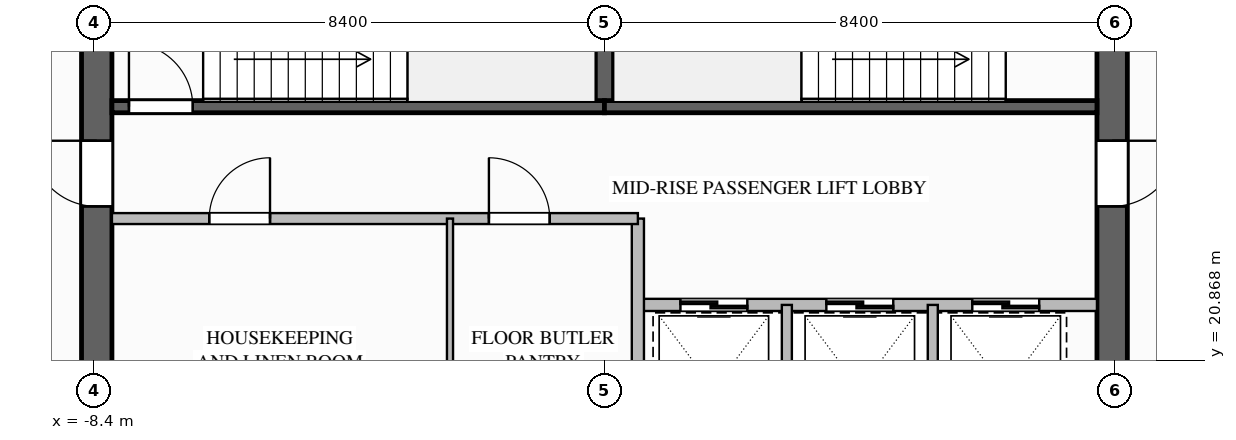
"""IFC4 building model, lengths in metres.
Left out: names, types, materials, properties, quantities, classifications, styles, units other than length and angle.
Written with IfcOpenShell. Run it as: python <this file> out.ifc"""

import sys

from ifc_helpers import new_model, si_unit, direction, frame, frame_2d, origin, place, context, subcontext, project, spatial, rectangle, extrude, element, fill, save


model = new_model("IFC4")
c1 = context("Model", 3, precision=1e-05, world=origin(), true_north=direction((0.0, 1.0)))
c2 = subcontext(c1, "Body", "Model", "MODEL_VIEW")
j1 = project(units=[si_unit("LENGTHUNIT", "METRE"), si_unit("PLANEANGLEUNIT", "RADIAN")], contexts=[c1])
p1 = place(None, origin())
s1 = spatial("IfcSite", under=j1, at=p1, CompositionType="ELEMENT")
p2 = place(p1, origin())
s2 = spatial("IfcBuilding", under=s1, at=p2, CompositionType="ELEMENT")
p3 = place(p2, frame((0.0, 0.0, 145.8)))
s3 = spatial("IfcBuildingStorey", under=s2, at=p3, CompositionType="ELEMENT", Elevation=145.8)
p4 = place(p3, frame((8.35, 35.1, 0.0), z_axis=(0.0, 0.0, 1.0), x_axis=(0.0, -1.0, 0.0)))
e1 = element("IfcWall", 1, at=p4, inside=s3, PredefinedType="SHEAR", context=c2, shape_type="SweptSolid", body=[
    extrude(rectangle(XDim=16.2, YDim=0.5, at=frame_2d((8.1, 0.0))), origin(), (0.0, 0.0, 1.0), 4.6),
])
p5 = place(p4, frame((3.08, 0.0, 0.0)))
e2 = element("IfcOpeningElement", 2, at=p5, cuts=e1, PredefinedType="OPENING", context=c2, shape_type="SweptSolid", body=[
    extrude(rectangle(XDim=1.12, YDim=2.1, at=frame_2d((0.56, 1.05))), frame((0.0, 0.26, 0.0), z_axis=(0.0, -1.0, 0.0), x_axis=(1.0, 0.0, 0.0)), (0.0, 0.0, 1.0), 0.52),
])
p6 = place(p4, frame((10.62, 0.0, 0.0)))
e3 = element("IfcOpeningElement", 3, at=p6, cuts=e1, PredefinedType="OPENING", context=c2, shape_type="SweptSolid", body=[
    extrude(rectangle(XDim=1.08, YDim=2.04, at=frame_2d((0.54, 1.02))), frame((0.0, 0.26, 0.0), z_axis=(0.0, -1.0, 0.0), x_axis=(1.0, 0.0, 0.0)), (0.0, 0.0, 1.0), 0.52),
])
p7 = place(p3, frame((-8.35, 18.9, 0.0), z_axis=(0.0, 0.0, 1.0), x_axis=(0.0, 1.0, 0.0)))
e4 = element("IfcWall", 4, at=p7, inside=s3, PredefinedType="SHEAR", context=c2, shape_type="SweptSolid", body=[
    extrude(rectangle(XDim=16.2, YDim=0.5, at=frame_2d((8.1, 0.0))), origin(), (0.0, 0.0, 1.0), 4.6),
])
p8 = place(p7, frame((12.02, 0.0, 0.0)))
e5 = element("IfcOpeningElement", 5, at=p8, cuts=e4, PredefinedType="OPENING", context=c2, shape_type="SweptSolid", body=[
    extrude(rectangle(XDim=1.08, YDim=2.04, at=frame_2d((0.54, 1.02))), frame((0.0, 0.26, 0.0), z_axis=(0.0, -1.0, 0.0), x_axis=(1.0, 0.0, 0.0)), (0.0, 0.0, 1.0), 0.52),
])
p9 = place(p7, frame((4.5, 0.0, 0.0)))
e6 = element("IfcOpeningElement", 6, at=p9, cuts=e4, PredefinedType="OPENING", context=c2, shape_type="SweptSolid", body=[
    extrude(rectangle(XDim=1.08, YDim=2.04, at=frame_2d((0.54, 1.02))), frame((0.0, 0.26, 0.0), z_axis=(0.0, -1.0, 0.0), x_axis=(1.0, 0.0, 0.0)), (0.0, 0.0, 1.0), 0.52),
])
p10 = place(p3, frame((0.0, 25.04, 0.0), z_axis=(0.0, 0.0, 1.0), x_axis=(0.0, 1.0, 0.0)))
e7 = element("IfcWall", 7, at=p10, inside=s3, PredefinedType="SOLIDWALL", context=c2, shape_type="SweptSolid", body=[
    extrude(rectangle(XDim=3.12, YDim=0.3, at=frame_2d((1.56, 0.0))), origin(), (0.0, 0.0, 1.0), 4.34),
])
p11 = place(p3, frame((-8.1, 25.04, 0.0), z_axis=(0.0, 0.0, 1.0), x_axis=(1.0, 0.0, 0.0)))
e8 = element("IfcWall", 8, at=p11, inside=s3, PredefinedType="SOLIDWALL", context=c2, shape_type="SweptSolid", body=[
    extrude(rectangle(XDim=8.1, YDim=0.2, at=frame_2d((4.05, 0.0))), origin(), (0.0, 0.0, 1.0), 4.34),
])
p12 = place(p11, frame((0.28, 0.0, 0.0)))
e9 = element("IfcOpeningElement", 9, at=p12, cuts=e8, PredefinedType="OPENING", context=c2, shape_type="SweptSolid", body=[
    extrude(rectangle(XDim=1.05, YDim=2.1, at=frame_2d((0.525, 1.05))), frame((0.0, 0.11, 0.0), z_axis=(0.0, -1.0, 0.0), x_axis=(1.0, 0.0, 0.0)), (0.0, 0.0, 1.0), 0.22),
])
p13 = place(p3, frame((0.0, 25.04, 0.0), z_axis=(0.0, 0.0, 1.0), x_axis=(1.0, 0.0, 0.0)))
e10 = element("IfcWall", 10, at=p13, inside=s3, PredefinedType="SOLIDWALL", context=c2, shape_type="SweptSolid", body=[
    extrude(rectangle(XDim=8.1, YDim=0.2, at=frame_2d((4.05, 0.0))), origin(), (0.0, 0.0, 1.0), 4.34),
])
p14 = place(p3, frame((8.1, 21.78, 0.0), z_axis=(0.0, 0.0, 1.0), x_axis=(-1.0, 0.0, 0.0)))
e11 = element("IfcWall", 11, at=p14, inside=s3, PredefinedType="SOLIDWALL", context=c2, shape_type="SweptSolid", body=[
    extrude(rectangle(XDim=7.55, YDim=0.2, at=frame_2d((3.775, 0.0))), origin(), (0.0, 0.0, 1.0), 4.34),
])
p15 = place(p14, frame((5.75, 0.0, 0.0)))
e12 = element("IfcOpeningElement", 12, at=p15, cuts=e11, PredefinedType="OPENING", context=c2, shape_type="SweptSolid", body=[
    extrude(rectangle(XDim=1.1, YDim=2.2, at=frame_2d((0.55, 1.1))), frame((0.0, 0.11, 0.0), z_axis=(0.0, -1.0, 0.0), x_axis=(1.0, 0.0, 0.0)), (0.0, 0.0, 1.0), 0.22),
])
p16 = place(p14, frame((3.35, 0.0, 0.0)))
e13 = element("IfcOpeningElement", 13, at=p16, cuts=e11, PredefinedType="OPENING", context=c2, shape_type="SweptSolid", body=[
    extrude(rectangle(XDim=1.1, YDim=2.2, at=frame_2d((0.55, 1.1))), frame((0.0, 0.11, 0.0), z_axis=(0.0, -1.0, 0.0), x_axis=(1.0, 0.0, 0.0)), (0.0, 0.0, 1.0), 0.22),
])
p17 = place(p14, frame((0.95, 0.0, 0.0)))
e14 = element("IfcOpeningElement", 14, at=p17, cuts=e11, PredefinedType="OPENING", context=c2, shape_type="SweptSolid", body=[
    extrude(rectangle(XDim=1.1, YDim=2.2, at=frame_2d((0.55, 1.1))), frame((0.0, 0.11, 0.0), z_axis=(0.0, -1.0, 0.0), x_axis=(1.0, 0.0, 0.0)), (0.0, 0.0, 1.0), 0.22),
])
p18 = place(p3, frame((0.55, 18.9, 0.0), z_axis=(0.0, 0.0, 1.0), x_axis=(0.0, 1.0, 0.0)))
e15 = element("IfcWall", 15, at=p18, inside=s3, PredefinedType="SOLIDWALL", context=c2, shape_type="SweptSolid", body=[
    extrude(rectangle(XDim=4.3, YDim=0.2, at=frame_2d((2.15, 0.0))), origin(), (0.0, 0.0, 1.0), 4.34),
])
for number, where, z_axis, x_axis in (
    (16, (3.0, 18.9, 0.0), (0.0, 0.0, 1.0), (0.0, 1.0, 0.0)),
    (17, (5.4, 18.9, 0.0), (0.0, 0.0, 1.0), (0.0, 1.0, 0.0)),
):
    element("IfcWall", number, at=place(p3, frame(where, z_axis=z_axis, x_axis=x_axis)), inside=s3, PredefinedType="PARTITIONING", context=c2, shape_type="SweptSolid", body=[
        extrude(rectangle(XDim=2.88, YDim=0.165, at=frame_2d((1.44, 0.0))), origin(), (0.0, 0.0, 1.0), 4.34),
    ])
p19 = place(p3, frame((-8.1, 23.2, 0.0), z_axis=(0.0, 0.0, 1.0), x_axis=(1.0, 0.0, 0.0)))
e18 = element("IfcWall", 18, at=p19, inside=s3, PredefinedType="SOLIDWALL", context=c2, shape_type="SweptSolid", body=[
    extrude(rectangle(XDim=8.65, YDim=0.18, at=frame_2d((4.325, 0.0))), origin(), (0.0, 0.0, 1.0), 4.34),
])
p20 = place(p19, frame((1.6, 0.0, 0.0)))
e19 = element("IfcOpeningElement", 19, at=p20, cuts=e18, PredefinedType="OPENING", context=c2, shape_type="SweptSolid", body=[
    extrude(rectangle(XDim=1.0, YDim=2.1, at=frame_2d((0.5, 1.05))), frame((0.0, 0.1, 0.0), z_axis=(0.0, -1.0, 0.0), x_axis=(1.0, 0.0, 0.0)), (0.0, 0.0, 1.0), 0.2),
])
p21 = place(p19, frame((6.2, 0.0, 0.0)))
e20 = element("IfcOpeningElement", 20, at=p21, cuts=e18, PredefinedType="OPENING", context=c2, shape_type="SweptSolid", body=[
    extrude(rectangle(XDim=1.0, YDim=2.1, at=frame_2d((0.5, 1.05))), frame((0.0, 0.1, 0.0), z_axis=(0.0, -1.0, 0.0), x_axis=(1.0, 0.0, 0.0)), (0.0, 0.0, 1.0), 0.2),
])
p22 = place(p3, frame((-2.54, 18.9, 0.0), z_axis=(0.0, 0.0, 1.0), x_axis=(0.0, 1.0, 0.0)))
e21 = element("IfcWall", 21, at=p22, inside=s3, PredefinedType="PARTITIONING", context=c2, shape_type="SweptSolid", body=[
    extrude(rectangle(XDim=4.3, YDim=0.1, at=frame_2d((2.15, 0.0))), origin(), (0.0, 0.0, 1.0), 4.34),
])
p23 = place(p12, origin())
e22 = element("IfcDoor", 22, at=p23, inside=s3, OperationType="SINGLE_SWING_LEFT", PredefinedType="DOOR", context=c2, shape_type="SweptSolid", body=[
    extrude(rectangle(XDim=1.05, YDim=2.1, at=frame_2d((0.525, 1.05))), frame((0.0, 0.025, 0.0), z_axis=(0.0, -1.0, 0.0), x_axis=(1.0, 0.0, 0.0)), (0.0, 0.0, 1.0), 0.05),
])
fill(e9, e22)
p24 = place(p15, origin())
e23 = element("IfcDoor", 23, at=p24, inside=s3, OperationType="SLIDING_TO_LEFT", PredefinedType="DOOR", context=c2, shape_type="SweptSolid", body=[
    extrude(rectangle(XDim=1.1, YDim=2.2, at=frame_2d((0.55, 1.1))), frame((0.0, 0.025, 0.0), z_axis=(0.0, -1.0, 0.0), x_axis=(1.0, 0.0, 0.0)), (0.0, 0.0, 1.0), 0.05),
])
fill(e12, e23)
p25 = place(p16, origin())
e24 = element("IfcDoor", 24, at=p25, inside=s3, OperationType="SLIDING_TO_LEFT", PredefinedType="DOOR", context=c2, shape_type="SweptSolid", body=[
    extrude(rectangle(XDim=1.1, YDim=2.2, at=frame_2d((0.55, 1.1))), frame((0.0, 0.025, 0.0), z_axis=(0.0, -1.0, 0.0), x_axis=(1.0, 0.0, 0.0)), (0.0, 0.0, 1.0), 0.05),
])
fill(e13, e24)
p26 = place(p17, origin())
e25 = element("IfcDoor", 25, at=p26, inside=s3, OperationType="SLIDING_TO_LEFT", PredefinedType="DOOR", context=c2, shape_type="SweptSolid", body=[
    extrude(rectangle(XDim=1.1, YDim=2.2, at=frame_2d((0.55, 1.1))), frame((0.0, 0.025, 0.0), z_axis=(0.0, -1.0, 0.0), x_axis=(1.0, 0.0, 0.0)), (0.0, 0.0, 1.0), 0.05),
])
fill(e14, e25)
p27 = place(p9, origin())
e26 = element("IfcDoor", 26, at=p27, inside=s3, OperationType="SINGLE_SWING_RIGHT", PredefinedType="DOOR", context=c2, shape_type="SweptSolid", body=[
    extrude(rectangle(XDim=1.08, YDim=2.04, at=frame_2d((0.54, 1.02))), frame((0.0, 0.025, 0.0), z_axis=(0.0, -1.0, 0.0), x_axis=(1.0, 0.0, 0.0)), (0.0, 0.0, 1.0), 0.05),
])
fill(e6, e26)
p28 = place(p6, origin())
e27 = element("IfcDoor", 27, at=p28, inside=s3, OperationType="SINGLE_SWING_LEFT", PredefinedType="DOOR", context=c2, shape_type="SweptSolid", body=[
    extrude(rectangle(XDim=1.08, YDim=2.04, at=frame_2d((0.54, 1.02))), frame((0.0, 0.025, 0.0), z_axis=(0.0, -1.0, 0.0), x_axis=(1.0, 0.0, 0.0)), (0.0, 0.0, 1.0), 0.05),
])
fill(e3, e27)
p29 = place(p20, origin())
e28 = element("IfcDoor", 28, at=p29, inside=s3, OperationType="SINGLE_SWING_RIGHT", PredefinedType="DOOR", context=c2, shape_type="SweptSolid", body=[
    extrude(rectangle(XDim=1.0, YDim=2.1, at=frame_2d((0.5, 1.05))), frame((0.0, 0.025, 0.0), z_axis=(0.0, -1.0, 0.0), x_axis=(1.0, 0.0, 0.0)), (0.0, 0.0, 1.0), 0.05),
])
fill(e19, e28)
p30 = place(p21, origin())
e29 = element("IfcDoor", 29, at=p30, inside=s3, OperationType="SINGLE_SWING_LEFT", PredefinedType="DOOR", context=c2, shape_type="SweptSolid", body=[
    extrude(rectangle(XDim=1.0, YDim=2.1, at=frame_2d((0.5, 1.05))), frame((0.0, 0.025, 0.0), z_axis=(0.0, -1.0, 0.0), x_axis=(1.0, 0.0, 0.0)), (0.0, 0.0, 1.0), 0.05),
])
fill(e20, e29)
save(model, sys.argv[1])
